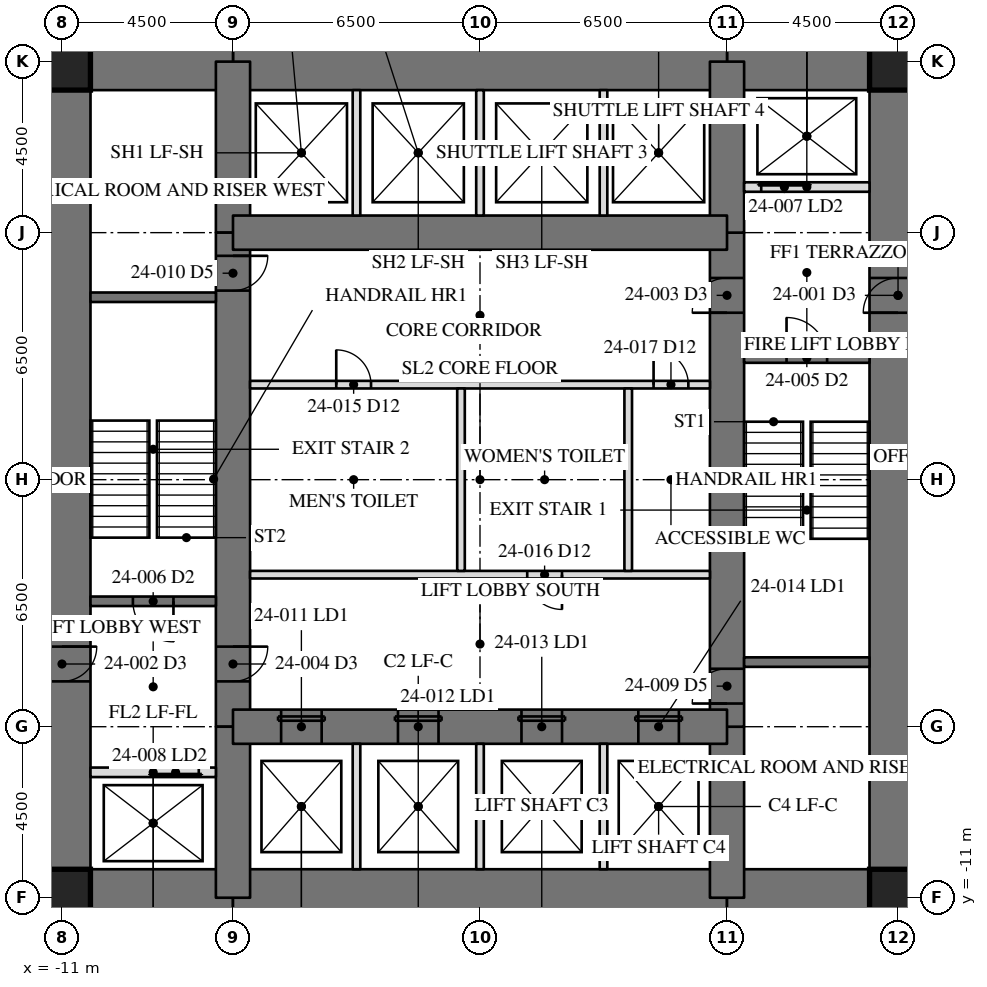
"""IFC4 building model, lengths in metres.
Left out: names, types, materials, properties, quantities, classifications, styles, units other than length and angle.
Written with IfcOpenShell. Run it as: python <this file> out.ifc"""

import sys

from ifc_helpers import new_model, si_unit, direction, frame, frame_2d, origin, origin_2d, place, context, subcontext, project, spatial, rectangle, hollow_rectangle, extrude, element, fill, save


model = new_model("IFC4")
c1 = context("Model", 3, precision=1e-05, world=origin(), true_north=direction((0.0, 1.0)))
c2 = subcontext(c1, "Body", "Model", "MODEL_VIEW")
j1 = project(units=[si_unit("LENGTHUNIT", "METRE"), si_unit("PLANEANGLEUNIT", "RADIAN")], contexts=[c1])
p1 = place(None, origin())
s1 = spatial("IfcSite", under=j1, at=p1, CompositionType="ELEMENT")
p2 = place(p1, origin())
s2 = spatial("IfcBuilding", under=s1, at=p2, CompositionType="ELEMENT")
p3 = place(p2, frame((0.0, 0.0, 104.9)))
s3 = spatial("IfcBuildingStorey", under=s2, at=p3, CompositionType="ELEMENT", Elevation=104.9)
p4 = place(p3, frame((11.0, -11.0, 0.0), z_axis=(0.0, 0.0, 1.0), x_axis=(0.0, 1.0, 0.0)))
e1 = element("IfcWall", 1, at=p4, inside=s3, PredefinedType="SHEAR", context=c2, shape_type="SweptSolid", body=[
    extrude(rectangle(XDim=22.0, YDim=1.5, at=frame_2d((11.0, 0.0))), origin(), (0.0, 0.0, 1.0), 4.1),
])
p5 = place(p4, frame((15.393, 0.0, 0.0)))
e2 = element("IfcOpeningElement", 2, at=p5, cuts=e1, PredefinedType="OPENING", context=c2, shape_type="SweptSolid", body=[
    extrude(rectangle(XDim=0.915, YDim=2.134, at=frame_2d((0.458, 1.067))), frame((0.0, 0.76, 0.0), z_axis=(0.0, -1.0, 0.0), x_axis=(1.0, 0.0, 0.0)), (0.0, 0.0, 1.0), 1.52),
])
p6 = place(p3, frame((-11.0, 11.0, 0.0), z_axis=(0.0, 0.0, 1.0), x_axis=(0.0, -1.0, 0.0)))
e3 = element("IfcWall", 3, at=p6, inside=s3, PredefinedType="SHEAR", context=c2, shape_type="SweptSolid", body=[
    extrude(rectangle(XDim=22.0, YDim=1.5, at=frame_2d((11.0, 0.0))), origin(), (0.0, 0.0, 1.0), 4.1),
])
p7 = place(p6, frame((15.393, 0.0, 0.0)))
e4 = element("IfcOpeningElement", 4, at=p7, cuts=e3, PredefinedType="OPENING", context=c2, shape_type="SweptSolid", body=[
    extrude(rectangle(XDim=0.915, YDim=2.134, at=frame_2d((0.458, 1.067))), frame((0.0, 0.76, 0.0), z_axis=(0.0, -1.0, 0.0), x_axis=(1.0, 0.0, 0.0)), (0.0, 0.0, 1.0), 1.52),
])
p8 = place(p3, frame((11.0, 11.0, 0.0), z_axis=(0.0, 0.0, 1.0), x_axis=(-1.0, 0.0, 0.0)))
e5 = element("IfcWall", 5, at=p8, inside=s3, PredefinedType="SHEAR", context=c2, shape_type="SweptSolid", body=[
    extrude(rectangle(XDim=4.5, YDim=1.5, at=frame_2d((2.25, 0.0))), origin(), (0.0, 0.0, 1.0), 4.1),
])
p9 = place(p3, frame((6.5, 11.0, 0.0), z_axis=(0.0, 0.0, 1.0), x_axis=(-1.0, 0.0, 0.0)))
e6 = element("IfcWall", 6, at=p9, inside=s3, PredefinedType="SHEAR", context=c2, shape_type="SweptSolid", body=[
    extrude(rectangle(XDim=13.0, YDim=1.5, at=frame_2d((6.5, 0.0))), origin(), (0.0, 0.0, 1.0), 4.1),
])
for number, where, z_axis, x_axis in (
    (7, (-6.5, 11.0, 0.0), (0.0, 0.0, 1.0), (-1.0, 0.0, 0.0)),
    (8, (-11.0, -11.0, 0.0), (0.0, 0.0, 1.0), (1.0, 0.0, 0.0)),
):
    element("IfcWall", number, at=place(p3, frame(where, z_axis=z_axis, x_axis=x_axis)), inside=s3, PredefinedType="SHEAR", context=c2, shape_type="SweptSolid", body=[
        extrude(rectangle(XDim=4.5, YDim=1.5, at=frame_2d((2.25, 0.0))), origin(), (0.0, 0.0, 1.0), 4.1),
    ])
p10 = place(p3, frame((-6.5, -11.0, 0.0), z_axis=(0.0, 0.0, 1.0), x_axis=(1.0, 0.0, 0.0)))
e9 = element("IfcWall", 9, at=p10, inside=s3, PredefinedType="SHEAR", context=c2, shape_type="SweptSolid", body=[
    extrude(rectangle(XDim=13.0, YDim=1.5, at=frame_2d((6.5, 0.0))), origin(), (0.0, 0.0, 1.0), 4.1),
])
p11 = place(p3, frame((6.5, -11.0, 0.0), z_axis=(0.0, 0.0, 1.0), x_axis=(1.0, 0.0, 0.0)))
e10 = element("IfcWall", 10, at=p11, inside=s3, PredefinedType="SHEAR", context=c2, shape_type="SweptSolid", body=[
    extrude(rectangle(XDim=4.5, YDim=1.5, at=frame_2d((2.25, 0.0))), origin(), (0.0, 0.0, 1.0), 4.1),
])
p12 = place(p3, frame((6.5, -11.0, 0.0), z_axis=(0.0, 0.0, 1.0), x_axis=(0.0, 1.0, 0.0)))
e11 = element("IfcWall", 11, at=p12, inside=s3, PredefinedType="SHEAR", context=c2, shape_type="SweptSolid", body=[
    extrude(rectangle(XDim=4.5, YDim=0.9, at=frame_2d((2.25, 0.0))), origin(), (0.0, 0.0, 1.0), 4.1),
])
p13 = place(p3, frame((6.5, -6.5, 0.0), z_axis=(0.0, 0.0, 1.0), x_axis=(0.0, 1.0, 0.0)))
e12 = element("IfcWall", 12, at=p13, inside=s3, PredefinedType="SHEAR", context=c2, shape_type="SweptSolid", body=[
    extrude(rectangle(XDim=13.0, YDim=0.9, at=frame_2d((6.5, 0.0))), origin(), (0.0, 0.0, 1.0), 4.1),
])
p14 = place(p13, frame((10.893, 0.0, 0.0)))
e13 = element("IfcOpeningElement", 13, at=p14, cuts=e12, PredefinedType="OPENING", context=c2, shape_type="SweptSolid", body=[
    extrude(rectangle(XDim=0.915, YDim=2.134, at=frame_2d((0.458, 1.067))), frame((0.0, 0.46, 0.0), z_axis=(0.0, -1.0, 0.0), x_axis=(1.0, 0.0, 0.0)), (0.0, 0.0, 1.0), 0.92),
])
p15 = place(p13, frame((0.61, 0.0, 0.0)))
e14 = element("IfcOpeningElement", 14, at=p15, cuts=e12, PredefinedType="OPENING", context=c2, shape_type="SweptSolid", body=[
    extrude(rectangle(XDim=0.915, YDim=2.134, at=frame_2d((0.458, 1.067))), frame((0.0, 0.46, 0.0), z_axis=(0.0, -1.0, 0.0), x_axis=(1.0, 0.0, 0.0)), (0.0, 0.0, 1.0), 0.92),
])
for number, where, z_axis, x_axis in (
    (15, (6.5, 6.5, 0.0), (0.0, 0.0, 1.0), (0.0, 1.0, 0.0)),
    (16, (-6.5, 11.0, 0.0), (0.0, 0.0, 1.0), (0.0, -1.0, 0.0)),
):
    element("IfcWall", number, at=place(p3, frame(where, z_axis=z_axis, x_axis=x_axis)), inside=s3, PredefinedType="SHEAR", context=c2, shape_type="SweptSolid", body=[
        extrude(rectangle(XDim=4.5, YDim=0.9, at=frame_2d((2.25, 0.0))), origin(), (0.0, 0.0, 1.0), 4.1),
    ])
p16 = place(p3, frame((-6.5, 6.5, 0.0), z_axis=(0.0, 0.0, 1.0), x_axis=(0.0, -1.0, 0.0)))
e17 = element("IfcWall", 17, at=p16, inside=s3, PredefinedType="SHEAR", context=c2, shape_type="SweptSolid", body=[
    extrude(rectangle(XDim=13.0, YDim=0.9, at=frame_2d((6.5, 0.0))), origin(), (0.0, 0.0, 1.0), 4.1),
])
p17 = place(p16, frame((10.893, 0.0, 0.0)))
e18 = element("IfcOpeningElement", 18, at=p17, cuts=e17, PredefinedType="OPENING", context=c2, shape_type="SweptSolid", body=[
    extrude(rectangle(XDim=0.915, YDim=2.134, at=frame_2d((0.458, 1.067))), frame((0.0, 0.46, 0.0), z_axis=(0.0, -1.0, 0.0), x_axis=(1.0, 0.0, 0.0)), (0.0, 0.0, 1.0), 0.92),
])
p18 = place(p16, frame((0.61, 0.0, 0.0)))
e19 = element("IfcOpeningElement", 19, at=p18, cuts=e17, PredefinedType="OPENING", context=c2, shape_type="SweptSolid", body=[
    extrude(rectangle(XDim=0.915, YDim=2.134, at=frame_2d((0.458, 1.067))), frame((0.0, 0.46, 0.0), z_axis=(0.0, -1.0, 0.0), x_axis=(1.0, 0.0, 0.0)), (0.0, 0.0, 1.0), 0.92),
])
p19 = place(p3, frame((-6.5, -6.5, 0.0), z_axis=(0.0, 0.0, 1.0), x_axis=(0.0, -1.0, 0.0)))
e20 = element("IfcWall", 20, at=p19, inside=s3, PredefinedType="SHEAR", context=c2, shape_type="SweptSolid", body=[
    extrude(rectangle(XDim=4.5, YDim=0.9, at=frame_2d((2.25, 0.0))), origin(), (0.0, 0.0, 1.0), 4.1),
])
p20 = place(p3, frame((6.5, 6.5, 0.0), z_axis=(0.0, 0.0, 1.0), x_axis=(-1.0, 0.0, 0.0)))
e21 = element("IfcWall", 21, at=p20, inside=s3, PredefinedType="SHEAR", context=c2, shape_type="SweptSolid", body=[
    extrude(rectangle(XDim=13.0, YDim=0.9, at=frame_2d((6.5, 0.0))), origin(), (0.0, 0.0, 1.0), 4.1),
])
p21 = place(p3, frame((-6.5, -6.5, 0.0), z_axis=(0.0, 0.0, 1.0), x_axis=(1.0, 0.0, 0.0)))
e22 = element("IfcWall", 22, at=p21, inside=s3, PredefinedType="SHEAR", context=c2, shape_type="SweptSolid", body=[
    extrude(rectangle(XDim=13.0, YDim=0.9, at=frame_2d((6.5, 0.0))), origin(), (0.0, 0.0, 1.0), 4.1),
])
p22 = place(p21, frame((1.267, 0.0, 0.0)))
e23 = element("IfcOpeningElement", 23, at=p22, cuts=e22, PredefinedType="OPENING", context=c2, shape_type="SweptSolid", body=[
    extrude(rectangle(XDim=1.067, YDim=2.134, at=frame_2d((0.533, 1.067))), frame((0.0, 0.46, 0.0), z_axis=(0.0, -1.0, 0.0), x_axis=(1.0, 0.0, 0.0)), (0.0, 0.0, 1.0), 0.92),
])
p23 = place(p21, frame((4.342, 0.0, 0.0)))
e24 = element("IfcOpeningElement", 24, at=p23, cuts=e22, PredefinedType="OPENING", context=c2, shape_type="SweptSolid", body=[
    extrude(rectangle(XDim=1.067, YDim=2.134, at=frame_2d((0.533, 1.067))), frame((0.0, 0.46, 0.0), z_axis=(0.0, -1.0, 0.0), x_axis=(1.0, 0.0, 0.0)), (0.0, 0.0, 1.0), 0.92),
])
p24 = place(p21, frame((7.592, 0.0, 0.0)))
e25 = element("IfcOpeningElement", 25, at=p24, cuts=e22, PredefinedType="OPENING", context=c2, shape_type="SweptSolid", body=[
    extrude(rectangle(XDim=1.067, YDim=2.134, at=frame_2d((0.533, 1.067))), frame((0.0, 0.46, 0.0), z_axis=(0.0, -1.0, 0.0), x_axis=(1.0, 0.0, 0.0)), (0.0, 0.0, 1.0), 0.92),
])
p25 = place(p21, frame((10.667, 0.0, 0.0)))
e26 = element("IfcOpeningElement", 26, at=p25, cuts=e22, PredefinedType="OPENING", context=c2, shape_type="SweptSolid", body=[
    extrude(rectangle(XDim=1.067, YDim=2.134, at=frame_2d((0.533, 1.067))), frame((0.0, 0.46, 0.0), z_axis=(0.0, -1.0, 0.0), x_axis=(1.0, 0.0, 0.0)), (0.0, 0.0, 1.0), 0.92),
])
for number, where, z_axis, x_axis in (
    (27, (11.0, 11.0, 0.0), (0.0, 0.0, 1.0), (1.0, 0.0, 0.0)),
    (28, (-11.0, 11.0, 0.0), (0.0, 0.0, 1.0), (1.0, 0.0, 0.0)),
    (29, (-11.0, -11.0, 0.0), (0.0, 0.0, 1.0), (1.0, 0.0, 0.0)),
    (30, (11.0, -11.0, 0.0), (0.0, 0.0, 1.0), (1.0, 0.0, 0.0)),
):
    element("IfcColumn", number, at=place(p3, frame(where, z_axis=z_axis, x_axis=x_axis)), inside=s3, PredefinedType="COLUMN", context=c2, shape_type="SweptSolid", body=[
        extrude(hollow_rectangle(XDim=1.499, YDim=1.499, WallThickness=0.102, at=origin_2d()), origin(), (0.0, 0.0, 1.0), 4.1),
    ])
for number, where, z_axis, x_axis in (
    (31, (6.95, -4.8, 0.0), (0.0, 0.0, 1.0), (1.0, 0.0, 0.0)),
    (32, (-6.95, 4.8, 0.0), (0.0, 0.0, 1.0), (-1.0, 0.0, 0.0)),
):
    element("IfcWall", number, at=place(p3, frame(where, z_axis=z_axis, x_axis=x_axis)), inside=s3, PredefinedType="SOLIDWALL", context=c2, shape_type="SweptSolid", body=[
        extrude(rectangle(XDim=3.3, YDim=0.25, at=frame_2d((1.65, 0.0))), origin(), (0.0, 0.0, 1.0), 3.91),
    ])
p26 = place(p3, frame((6.95, 3.2, 0.0), z_axis=(0.0, 0.0, 1.0), x_axis=(1.0, 0.0, 0.0)))
e33 = element("IfcWall", 33, at=p26, inside=s3, PredefinedType="SOLIDWALL", context=c2, shape_type="SweptSolid", body=[
    extrude(rectangle(XDim=3.3, YDim=0.25, at=frame_2d((1.65, 0.0))), origin(), (0.0, 0.0, 1.0), 3.91),
])
p27 = place(p26, frame((1.116, 0.0, 0.0)))
e34 = element("IfcOpeningElement", 34, at=p27, cuts=e33, PredefinedType="OPENING", context=c2, shape_type="SweptSolid", body=[
    extrude(rectangle(XDim=1.067, YDim=2.134, at=frame_2d((0.533, 1.067))), frame((0.0, 0.135, 0.0), z_axis=(0.0, -1.0, 0.0), x_axis=(1.0, 0.0, 0.0)), (0.0, 0.0, 1.0), 0.27),
])
p28 = place(p3, frame((-6.95, -3.2, 0.0), z_axis=(0.0, 0.0, 1.0), x_axis=(-1.0, 0.0, 0.0)))
e35 = element("IfcWall", 35, at=p28, inside=s3, PredefinedType="SOLIDWALL", context=c2, shape_type="SweptSolid", body=[
    extrude(rectangle(XDim=3.3, YDim=0.25, at=frame_2d((1.65, 0.0))), origin(), (0.0, 0.0, 1.0), 3.91),
])
p29 = place(p28, frame((1.116, 0.0, 0.0)))
e36 = element("IfcOpeningElement", 36, at=p29, cuts=e35, PredefinedType="OPENING", context=c2, shape_type="SweptSolid", body=[
    extrude(rectangle(XDim=1.067, YDim=2.134, at=frame_2d((0.533, 1.067))), frame((0.0, 0.135, 0.0), z_axis=(0.0, -1.0, 0.0), x_axis=(1.0, 0.0, 0.0)), (0.0, 0.0, 1.0), 0.27),
])
p30 = place(p3, frame((6.95, 7.7, 0.0), z_axis=(0.0, 0.0, 1.0), x_axis=(1.0, 0.0, 0.0)))
e37 = element("IfcWall", 37, at=p30, inside=s3, PredefinedType="PARTITIONING", context=c2, shape_type="SweptSolid", body=[
    extrude(rectangle(XDim=3.3, YDim=0.25, at=frame_2d((1.65, 0.0))), origin(), (0.0, 0.0, 1.0), 3.91),
])
p31 = place(p30, frame((0.45, 0.0, 0.0)))
e38 = element("IfcOpeningElement", 38, at=p31, cuts=e37, PredefinedType="OPENING", context=c2, shape_type="SweptSolid", body=[
    extrude(rectangle(XDim=1.219, YDim=2.134, at=frame_2d((0.609, 1.067))), frame((0.0, 0.135, 0.0), z_axis=(0.0, -1.0, 0.0), x_axis=(1.0, 0.0, 0.0)), (0.0, 0.0, 1.0), 0.27),
])
p32 = place(p3, frame((-6.95, -7.7, 0.0), z_axis=(0.0, 0.0, 1.0), x_axis=(-1.0, 0.0, 0.0)))
e39 = element("IfcWall", 39, at=p32, inside=s3, PredefinedType="PARTITIONING", context=c2, shape_type="SweptSolid", body=[
    extrude(rectangle(XDim=3.3, YDim=0.25, at=frame_2d((1.65, 0.0))), origin(), (0.0, 0.0, 1.0), 3.91),
])
p33 = place(p32, frame((0.45, 0.0, 0.0)))
e40 = element("IfcOpeningElement", 40, at=p33, cuts=e39, PredefinedType="OPENING", context=c2, shape_type="SweptSolid", body=[
    extrude(rectangle(XDim=1.219, YDim=2.134, at=frame_2d((0.609, 1.067))), frame((0.0, 0.135, 0.0), z_axis=(0.0, -1.0, 0.0), x_axis=(1.0, 0.0, 0.0)), (0.0, 0.0, 1.0), 0.27),
])
p34 = place(p3, frame((-6.05, 2.5, 0.0), z_axis=(0.0, 0.0, 1.0), x_axis=(1.0, 0.0, 0.0)))
e41 = element("IfcWall", 41, at=p34, inside=s3, PredefinedType="PARTITIONING", context=c2, shape_type="SweptSolid", body=[
    extrude(rectangle(XDim=12.1, YDim=0.2, at=frame_2d((6.05, 0.0))), origin(), (0.0, 0.0, 1.0), 3.91),
])
p35 = place(p34, frame((2.268, 0.0, 0.0)))
e42 = element("IfcOpeningElement", 42, at=p35, cuts=e41, PredefinedType="OPENING", context=c2, shape_type="SweptSolid", body=[
    extrude(rectangle(XDim=0.915, YDim=2.134, at=frame_2d((0.458, 1.067))), frame((0.0, 0.11, 0.0), z_axis=(0.0, -1.0, 0.0), x_axis=(1.0, 0.0, 0.0)), (0.0, 0.0, 1.0), 0.22),
])
p36 = place(p34, frame((10.617, 0.0, 0.0)))
e43 = element("IfcOpeningElement", 43, at=p36, cuts=e41, PredefinedType="OPENING", context=c2, shape_type="SweptSolid", body=[
    extrude(rectangle(XDim=0.915, YDim=2.134, at=frame_2d((0.458, 1.067))), frame((0.0, 0.11, 0.0), z_axis=(0.0, -1.0, 0.0), x_axis=(1.0, 0.0, 0.0)), (0.0, 0.0, 1.0), 0.22),
])
p37 = place(p3, frame((6.05, -2.5, 0.0), z_axis=(0.0, 0.0, 1.0), x_axis=(-1.0, 0.0, 0.0)))
e44 = element("IfcWall", 44, at=p37, inside=s3, PredefinedType="PARTITIONING", context=c2, shape_type="SweptSolid", body=[
    extrude(rectangle(XDim=12.1, YDim=0.2, at=frame_2d((6.05, 0.0))), origin(), (0.0, 0.0, 1.0), 3.91),
])
p38 = place(p37, frame((3.893, 0.0, 0.0)))
e45 = element("IfcOpeningElement", 45, at=p38, cuts=e44, PredefinedType="OPENING", context=c2, shape_type="SweptSolid", body=[
    extrude(rectangle(XDim=0.915, YDim=2.134, at=frame_2d((0.458, 1.067))), frame((0.0, 0.11, 0.0), z_axis=(0.0, -1.0, 0.0), x_axis=(1.0, 0.0, 0.0)), (0.0, 0.0, 1.0), 0.22),
])
for number, where, z_axis, x_axis in (
    (46, (-3.25, 6.95, 0.0), (0.0, 0.0, 1.0), (0.0, 1.0, 0.0)),
    (47, (0.0, 6.95, 0.0), (0.0, 0.0, 1.0), (0.0, 1.0, 0.0)),
    (48, (3.25, 6.95, 0.0), (0.0, 0.0, 1.0), (0.0, 1.0, 0.0)),
    (49, (-3.25, -10.25, 0.0), (0.0, 0.0, 1.0), (0.0, 1.0, 0.0)),
    (50, (0.0, -10.25, 0.0), (0.0, 0.0, 1.0), (0.0, 1.0, 0.0)),
    (51, (3.25, -10.25, 0.0), (0.0, 0.0, 1.0), (0.0, 1.0, 0.0)),
):
    element("IfcWall", number, at=place(p3, frame(where, z_axis=z_axis, x_axis=x_axis)), inside=s3, PredefinedType="PARTITIONING", context=c2, shape_type="SweptSolid", body=[
        extrude(rectangle(XDim=3.3, YDim=0.2, at=frame_2d((1.65, 0.0))), origin(), (0.0, 0.0, 1.0), 3.91),
    ])
for number, where, z_axis, x_axis in (
    (52, (-0.5, -2.4, 0.0), (0.0, 0.0, 1.0), (0.0, 1.0, 0.0)),
    (53, (3.9, -2.4, 0.0), (0.0, 0.0, 1.0), (0.0, 1.0, 0.0)),
):
    element("IfcWall", number, at=place(p3, frame(where, z_axis=z_axis, x_axis=x_axis)), inside=s3, PredefinedType="PARTITIONING", context=c2, shape_type="SweptSolid", body=[
        extrude(rectangle(XDim=4.8, YDim=0.2, at=frame_2d((2.4, 0.0))), origin(), (0.0, 0.0, 1.0), 3.91),
    ])
p39 = place(p14, origin())
e54 = element("IfcDoor", 54, at=p39, inside=s3, OperationType="SINGLE_SWING_RIGHT", PredefinedType="DOOR", context=c2, shape_type="SweptSolid", body=[
    extrude(rectangle(XDim=0.915, YDim=2.134, at=frame_2d((0.458, 1.067))), frame((0.0, -0.375, 0.0), z_axis=(0.0, -1.0, 0.0), x_axis=(1.0, 0.0, 0.0)), (0.0, 0.0, 1.0), 0.05),
])
fill(e13, e54)
p40 = place(p17, origin())
e55 = element("IfcDoor", 55, at=p40, inside=s3, OperationType="SINGLE_SWING_RIGHT", PredefinedType="DOOR", context=c2, shape_type="SweptSolid", body=[
    extrude(rectangle(XDim=0.915, YDim=2.134, at=frame_2d((0.458, 1.067))), frame((0.0, -0.375, 0.0), z_axis=(0.0, -1.0, 0.0), x_axis=(1.0, 0.0, 0.0)), (0.0, 0.0, 1.0), 0.05),
])
fill(e18, e55)
p41 = place(p27, origin())
e56 = element("IfcDoor", 56, at=p41, inside=s3, OperationType="SINGLE_SWING_LEFT", PredefinedType="DOOR", context=c2, shape_type="SweptSolid", body=[
    extrude(rectangle(XDim=1.067, YDim=2.134, at=frame_2d((0.533, 1.067))), frame((0.0, 0.025, 0.0), z_axis=(0.0, -1.0, 0.0), x_axis=(1.0, 0.0, 0.0)), (0.0, 0.0, 1.0), 0.05),
])
fill(e34, e56)
p42 = place(p29, origin())
e57 = element("IfcDoor", 57, at=p42, inside=s3, OperationType="SINGLE_SWING_LEFT", PredefinedType="DOOR", context=c2, shape_type="SweptSolid", body=[
    extrude(rectangle(XDim=1.067, YDim=2.134, at=frame_2d((0.533, 1.067))), frame((0.0, 0.025, 0.0), z_axis=(0.0, -1.0, 0.0), x_axis=(1.0, 0.0, 0.0)), (0.0, 0.0, 1.0), 0.05),
])
fill(e36, e57)
p43 = place(p31, origin())
e58 = element("IfcDoor", 58, at=p43, inside=s3, OperationType="SLIDING_TO_LEFT", PredefinedType="DOOR", context=c2, shape_type="SweptSolid", body=[
    extrude(rectangle(XDim=1.219, YDim=2.134, at=frame_2d((0.609, 1.067))), frame((0.0, 0.025, 0.0), z_axis=(0.0, -1.0, 0.0), x_axis=(1.0, 0.0, 0.0)), (0.0, 0.0, 1.0), 0.05),
])
fill(e38, e58)
p44 = place(p33, origin())
e59 = element("IfcDoor", 59, at=p44, inside=s3, OperationType="SLIDING_TO_LEFT", PredefinedType="DOOR", context=c2, shape_type="SweptSolid", body=[
    extrude(rectangle(XDim=1.219, YDim=2.134, at=frame_2d((0.609, 1.067))), frame((0.0, 0.025, 0.0), z_axis=(0.0, -1.0, 0.0), x_axis=(1.0, 0.0, 0.0)), (0.0, 0.0, 1.0), 0.05),
])
fill(e40, e59)
p45 = place(p15, origin())
e60 = element("IfcDoor", 60, at=p45, inside=s3, OperationType="SINGLE_SWING_RIGHT", PredefinedType="DOOR", context=c2, shape_type="SweptSolid", body=[
    extrude(rectangle(XDim=0.915, YDim=2.134, at=frame_2d((0.458, 1.067))), frame((0.0, -0.375, 0.0), z_axis=(0.0, -1.0, 0.0), x_axis=(1.0, 0.0, 0.0)), (0.0, 0.0, 1.0), 0.05),
])
fill(e14, e60)
p46 = place(p18, origin())
e61 = element("IfcDoor", 61, at=p46, inside=s3, OperationType="SINGLE_SWING_RIGHT", PredefinedType="DOOR", context=c2, shape_type="SweptSolid", body=[
    extrude(rectangle(XDim=0.915, YDim=2.134, at=frame_2d((0.458, 1.067))), frame((0.0, -0.375, 0.0), z_axis=(0.0, -1.0, 0.0), x_axis=(1.0, 0.0, 0.0)), (0.0, 0.0, 1.0), 0.05),
])
fill(e19, e61)
p47 = place(p22, origin())
e62 = element("IfcDoor", 62, at=p47, inside=s3, OperationType="SLIDING_TO_LEFT", PredefinedType="DOOR", context=c2, shape_type="SweptSolid", body=[
    extrude(rectangle(XDim=1.067, YDim=2.134, at=frame_2d((0.533, 1.067))), frame((0.0, -0.375, 0.0), z_axis=(0.0, -1.0, 0.0), x_axis=(1.0, 0.0, 0.0)), (0.0, 0.0, 1.0), 0.05),
])
fill(e23, e62)
p48 = place(p23, origin())
e63 = element("IfcDoor", 63, at=p48, inside=s3, OperationType="SLIDING_TO_LEFT", PredefinedType="DOOR", context=c2, shape_type="SweptSolid", body=[
    extrude(rectangle(XDim=1.067, YDim=2.134, at=frame_2d((0.533, 1.067))), frame((0.0, -0.375, 0.0), z_axis=(0.0, -1.0, 0.0), x_axis=(1.0, 0.0, 0.0)), (0.0, 0.0, 1.0), 0.05),
])
fill(e24, e63)
p49 = place(p24, origin())
e64 = element("IfcDoor", 64, at=p49, inside=s3, OperationType="SLIDING_TO_LEFT", PredefinedType="DOOR", context=c2, shape_type="SweptSolid", body=[
    extrude(rectangle(XDim=1.067, YDim=2.134, at=frame_2d((0.533, 1.067))), frame((0.0, -0.375, 0.0), z_axis=(0.0, -1.0, 0.0), x_axis=(1.0, 0.0, 0.0)), (0.0, 0.0, 1.0), 0.05),
])
fill(e25, e64)
p50 = place(p25, origin())
e65 = element("IfcDoor", 65, at=p50, inside=s3, OperationType="SLIDING_TO_LEFT", PredefinedType="DOOR", context=c2, shape_type="SweptSolid", body=[
    extrude(rectangle(XDim=1.067, YDim=2.134, at=frame_2d((0.533, 1.067))), frame((0.0, -0.375, 0.0), z_axis=(0.0, -1.0, 0.0), x_axis=(1.0, 0.0, 0.0)), (0.0, 0.0, 1.0), 0.05),
])
fill(e26, e65)
p51 = place(p35, origin())
e66 = element("IfcDoor", 66, at=p51, inside=s3, OperationType="SINGLE_SWING_LEFT", PredefinedType="DOOR", context=c2, shape_type="SweptSolid", body=[
    extrude(rectangle(XDim=0.915, YDim=2.134, at=frame_2d((0.458, 1.067))), frame((0.0, 0.025, 0.0), z_axis=(0.0, -1.0, 0.0), x_axis=(1.0, 0.0, 0.0)), (0.0, 0.0, 1.0), 0.05),
])
fill(e42, e66)
p52 = place(p38, origin())
e67 = element("IfcDoor", 67, at=p52, inside=s3, OperationType="SINGLE_SWING_LEFT", PredefinedType="DOOR", context=c2, shape_type="SweptSolid", body=[
    extrude(rectangle(XDim=0.915, YDim=2.134, at=frame_2d((0.458, 1.067))), frame((0.0, 0.025, 0.0), z_axis=(0.0, -1.0, 0.0), x_axis=(1.0, 0.0, 0.0)), (0.0, 0.0, 1.0), 0.05),
])
fill(e45, e67)
p53 = place(p36, origin())
e68 = element("IfcDoor", 68, at=p53, inside=s3, OperationType="SINGLE_SWING_LEFT", PredefinedType="DOOR", context=c2, shape_type="SweptSolid", body=[
    extrude(rectangle(XDim=0.915, YDim=2.134, at=frame_2d((0.458, 1.067))), frame((0.0, 0.025, 0.0), z_axis=(0.0, -1.0, 0.0), x_axis=(1.0, 0.0, 0.0)), (0.0, 0.0, 1.0), 0.05),
])
fill(e43, e68)
save(model, sys.argv[1])
